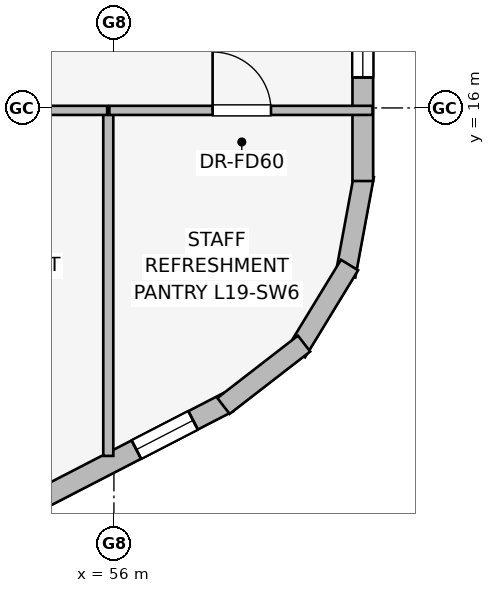
"""IFC4 building model, lengths in metres.
Left out: names, types, materials, properties, quantities, classifications, styles, units other than length and angle.
Written with IfcOpenShell. Run it as: python <this file> out.ifc"""

import sys

from ifc_helpers import new_model, si_unit, direction, frame, frame_2d, origin, place, context, subcontext, project, spatial, rectangle, extrude, element, fill, save


model = new_model("IFC4")
c1 = context("Model", 3, precision=1e-05, world=origin(), true_north=direction((0.0, 1.0)))
c2 = subcontext(c1, "Body", "Model", "MODEL_VIEW")
j1 = project(units=[si_unit("LENGTHUNIT", "METRE"), si_unit("PLANEANGLEUNIT", "RADIAN")], contexts=[c1])
p1 = place(None, origin())
s1 = spatial("IfcSite", under=j1, at=p1, CompositionType="ELEMENT")
p2 = place(p1, origin())
s2 = spatial("IfcBuilding", under=s1, at=p2, CompositionType="ELEMENT")
p3 = place(p2, frame((0.0, 0.0, 74.45)))
s3 = spatial("IfcBuildingStorey", under=s2, at=p3, CompositionType="ELEMENT", Elevation=74.45)
p4 = place(p3, frame((57.876, 11.159, 0.0), z_axis=(0.0, 0.0, 1.0), x_axis=(-0.888634413993, -0.458616264721, 0.0)))
e1 = element("IfcWall", 1, at=p4, inside=s3, PredefinedType="STANDARD", context=c2, shape_type="SweptSolid", body=[
    extrude(rectangle(XDim=20.531, YDim=0.34, at=frame_2d((10.266, 0.0))), origin(), (0.0, 0.0, 1.0), 2.684),
])
p5 = place(p4, frame((0.646, 0.0, 0.75)))
e2 = element("IfcOpeningElement", 2, at=p5, cuts=e1, PredefinedType="OPENING", context=c2, shape_type="SweptSolid", body=[
    extrude(rectangle(XDim=1.05, YDim=1.4, at=frame_2d((0.525, 0.7))), frame((0.0, 0.18, 0.0), z_axis=(0.0, -1.0, 0.0), x_axis=(1.0, 0.0, 0.0)), (0.0, 0.0, 1.0), 0.36),
])
p6 = place(p4, frame((5.077, 0.0, 0.75)))
e3 = element("IfcOpeningElement", 3, at=p6, cuts=e1, PredefinedType="OPENING", context=c2, shape_type="SweptSolid", body=[
    extrude(rectangle(XDim=1.05, YDim=1.4, at=frame_2d((0.525, 0.7))), frame((0.0, 0.18, 0.0), z_axis=(0.0, -1.0, 0.0), x_axis=(1.0, 0.0, 0.0)), (0.0, 0.0, 1.0), 0.36),
])
p7 = place(p4, frame((7.37, 0.0, 0.75)))
e4 = element("IfcOpeningElement", 4, at=p7, cuts=e1, PredefinedType="OPENING", context=c2, shape_type="SweptSolid", body=[
    extrude(rectangle(XDim=1.8, YDim=1.5, at=frame_2d((0.9, 0.75))), frame((0.0, 0.18, 0.0), z_axis=(0.0, -1.0, 0.0), x_axis=(1.0, 0.0, 0.0)), (0.0, 0.0, 1.0), 0.36),
])
p8 = place(p4, frame((9.746, 0.0, 0.75)))
e5 = element("IfcOpeningElement", 5, at=p8, cuts=e1, PredefinedType="OPENING", context=c2, shape_type="SweptSolid", body=[
    extrude(rectangle(XDim=1.8, YDim=1.5, at=frame_2d((0.9, 0.75))), frame((0.0, 0.18, 0.0), z_axis=(0.0, -1.0, 0.0), x_axis=(1.0, 0.0, 0.0)), (0.0, 0.0, 1.0), 0.36),
])
p9 = place(p4, frame((13.372, 0.0, 0.75)))
e6 = element("IfcOpeningElement", 6, at=p9, cuts=e1, PredefinedType="OPENING", context=c2, shape_type="SweptSolid", body=[
    extrude(rectangle(XDim=1.5, YDim=1.5, at=frame_2d((0.75, 0.75))), frame((0.0, 0.18, 0.0), z_axis=(0.0, -1.0, 0.0), x_axis=(1.0, 0.0, 0.0)), (0.0, 0.0, 1.0), 0.36),
])
p10 = place(p4, frame((18.484, 0.0, 0.75)))
e7 = element("IfcOpeningElement", 7, at=p10, cuts=e1, PredefinedType="OPENING", context=c2, shape_type="SweptSolid", body=[
    extrude(rectangle(XDim=1.05, YDim=1.4, at=frame_2d((0.525, 0.7))), frame((0.0, 0.18, 0.0), z_axis=(0.0, -1.0, 0.0), x_axis=(1.0, 0.0, 0.0)), (0.0, 0.0, 1.0), 0.36),
])
p11 = place(p3, frame((60.113, 14.892, 0.0), z_axis=(0.0, 0.0, 1.0), x_axis=(-0.181714143354, -0.983351397063, 0.0)))
e8 = element("IfcWall", 8, at=p11, inside=s3, PredefinedType="STANDARD", context=c2, shape_type="SweptSolid", body=[
    extrude(rectangle(XDim=1.678, YDim=0.33, at=frame_2d((0.839, 0.0))), origin(), (0.0, 0.0, 1.0), 3.39),
])
p12 = place(p3, frame((59.875, 13.417, 0.0), z_axis=(0.0, 0.0, 1.0), x_axis=(-0.520584129191, -0.853810379671, 0.0)))
e9 = element("IfcWall", 9, at=p12, inside=s3, PredefinedType="STANDARD", context=c2, shape_type="SweptSolid", body=[
    extrude(rectangle(XDim=1.677, YDim=0.33, at=frame_2d((0.838, 0.0))), origin(), (0.0, 0.0, 1.0), 3.39),
])
p13 = place(p3, frame((59.127, 12.125, 0.0), z_axis=(0.0, 0.0, 1.0), x_axis=(-0.790691856293, -0.61221433207, 0.0)))
e10 = element("IfcWall", 10, at=p13, inside=s3, PredefinedType="STANDARD", context=c2, shape_type="SweptSolid", body=[
    extrude(rectangle(XDim=1.676, YDim=0.33, at=frame_2d((0.838, 0.0))), origin(), (0.0, 0.0, 1.0), 3.39),
])
p14 = place(p3, frame((60.093, 33.202, 0.0), z_axis=(0.0, 0.0, 1.0), x_axis=(0.0, -1.0, 0.0)))
e11 = element("IfcWall", 11, at=p14, inside=s3, PredefinedType="STANDARD", context=c2, shape_type="SweptSolid", body=[
    extrude(rectangle(XDim=18.404, YDim=0.34, at=frame_2d((9.202, 0.0))), origin(), (0.0, 0.0, 1.0), 2.684),
])
p15 = place(p14, frame((1.744, 0.0, 0.75)))
e12 = element("IfcOpeningElement", 12, at=p15, cuts=e11, PredefinedType="OPENING", context=c2, shape_type="SweptSolid", body=[
    extrude(rectangle(XDim=1.05, YDim=1.4, at=frame_2d((0.525, 0.7))), frame((0.0, 0.18, 0.0), z_axis=(0.0, -1.0, 0.0), x_axis=(1.0, 0.0, 0.0)), (0.0, 0.0, 1.0), 0.36),
])
p16 = place(p14, frame((5.067, 0.0, 0.75)))
e13 = element("IfcOpeningElement", 13, at=p16, cuts=e11, PredefinedType="OPENING", context=c2, shape_type="SweptSolid", body=[
    extrude(rectangle(XDim=1.5, YDim=1.5, at=frame_2d((0.75, 0.75))), frame((0.0, 0.18, 0.0), z_axis=(0.0, -1.0, 0.0), x_axis=(1.0, 0.0, 0.0)), (0.0, 0.0, 1.0), 0.36),
])
p17 = place(p14, frame((7.858, 0.0, 0.75)))
e14 = element("IfcOpeningElement", 14, at=p17, cuts=e11, PredefinedType="OPENING", context=c2, shape_type="SweptSolid", body=[
    extrude(rectangle(XDim=1.5, YDim=1.5, at=frame_2d((0.75, 0.75))), frame((0.0, 0.18, 0.0), z_axis=(0.0, -1.0, 0.0), x_axis=(1.0, 0.0, 0.0)), (0.0, 0.0, 1.0), 0.36),
])
p18 = place(p14, frame((11.456, 0.0, 0.75)))
e15 = element("IfcOpeningElement", 15, at=p18, cuts=e11, PredefinedType="OPENING", context=c2, shape_type="SweptSolid", body=[
    extrude(rectangle(XDim=1.8, YDim=1.5, at=frame_2d((0.9, 0.75))), frame((0.0, 0.18, 0.0), z_axis=(0.0, -1.0, 0.0), x_axis=(1.0, 0.0, 0.0)), (0.0, 0.0, 1.0), 0.36),
])
p19 = place(p14, frame((15.65, 0.0, 0.75)))
e16 = element("IfcOpeningElement", 16, at=p19, cuts=e11, PredefinedType="OPENING", context=c2, shape_type="SweptSolid", body=[
    extrude(rectangle(XDim=1.05, YDim=1.4, at=frame_2d((0.525, 0.7))), frame((0.0, 0.18, 0.0), z_axis=(0.0, -1.0, 0.0), x_axis=(1.0, 0.0, 0.0)), (0.0, 0.0, 1.0), 0.36),
])
p20 = place(p3, frame((55.907, 10.278, 0.0), z_axis=(0.0, 0.0, 1.0), x_axis=(0.0, 1.0, 0.0)))
e17 = element("IfcWall", 17, at=p20, inside=s3, PredefinedType="PARTITIONING", context=c2, shape_type="SweptSolid", body=[
    extrude(rectangle(XDim=5.652, YDim=0.165, at=frame_2d((2.826, 0.0))), origin(), (0.0, 0.0, 1.0), 3.39),
])
p21 = place(p3, frame((51.868, 15.96, 0.0), z_axis=(0.0, 0.0, 1.0), x_axis=(1.0, 0.0, 0.0)))
e18 = element("IfcWall", 18, at=p21, inside=s3, PredefinedType="PARTITIONING", context=c2, shape_type="SweptSolid", body=[
    extrude(rectangle(XDim=4.021, YDim=0.15, at=frame_2d((2.01, 0.0))), origin(), (0.0, 0.0, 1.0), 3.39),
])
p22 = place(p21, frame((1.531, 0.0, 0.0)))
e19 = element("IfcOpeningElement", 19, at=p22, cuts=e18, PredefinedType="OPENING", context=c2, shape_type="SweptSolid", body=[
    extrude(rectangle(XDim=0.96, YDim=2.0, at=frame_2d((0.48, 1.0))), frame((0.0, 0.085, 0.0), z_axis=(0.0, -1.0, 0.0), x_axis=(1.0, 0.0, 0.0)), (0.0, 0.0, 1.0), 0.17),
])
p23 = place(p3, frame((55.925, 15.96, 0.0), z_axis=(0.0, 0.0, 1.0), x_axis=(1.0, 0.0, 0.0)))
e20 = element("IfcWall", 20, at=p23, inside=s3, PredefinedType="PARTITIONING", context=c2, shape_type="SweptSolid", body=[
    extrude(rectangle(XDim=4.328, YDim=0.15, at=frame_2d((2.164, 0.0))), origin(), (0.0, 0.0, 1.0), 3.39),
])
p24 = place(p23, frame((1.698, 0.0, 0.0)))
e21 = element("IfcOpeningElement", 21, at=p24, cuts=e20, PredefinedType="OPENING", context=c2, shape_type="SweptSolid", body=[
    extrude(rectangle(XDim=0.96, YDim=2.0, at=frame_2d((0.48, 1.0))), frame((0.0, 0.085, 0.0), z_axis=(0.0, -1.0, 0.0), x_axis=(1.0, 0.0, 0.0)), (0.0, 0.0, 1.0), 0.17),
])
p25 = place(p5, origin())
e22 = element("IfcWindow", 22, at=p25, inside=s3, PartitioningType="SINGLE_PANEL", PredefinedType="WINDOW", context=c2, shape_type="SweptSolid", body=[
    extrude(rectangle(XDim=1.05, YDim=1.4, at=frame_2d((0.525, 0.7))), frame((0.0, 0.03, 0.0), z_axis=(0.0, -1.0, 0.0), x_axis=(1.0, 0.0, 0.0)), (0.0, 0.0, 1.0), 0.06),
])
fill(e2, e22)
p26 = place(p19, origin())
e23 = element("IfcWindow", 23, at=p26, inside=s3, PartitioningType="SINGLE_PANEL", PredefinedType="WINDOW", context=c2, shape_type="SweptSolid", body=[
    extrude(rectangle(XDim=1.05, YDim=1.4, at=frame_2d((0.525, 0.7))), frame((0.0, 0.03, 0.0), z_axis=(0.0, -1.0, 0.0), x_axis=(1.0, 0.0, 0.0)), (0.0, 0.0, 1.0), 0.06),
])
fill(e16, e23)
p27 = place(p24, origin())
e24 = element("IfcDoor", 24, at=p27, inside=s3, OperationType="SINGLE_SWING_LEFT", PredefinedType="DOOR", context=c2, shape_type="SweptSolid", body=[
    extrude(rectangle(XDim=0.96, YDim=2.0, at=frame_2d((0.48, 1.0))), frame((0.0, 0.025, 0.0), z_axis=(0.0, -1.0, 0.0), x_axis=(1.0, 0.0, 0.0)), (0.0, 0.0, 1.0), 0.05),
])
fill(e21, e24)
save(model, sys.argv[1])
